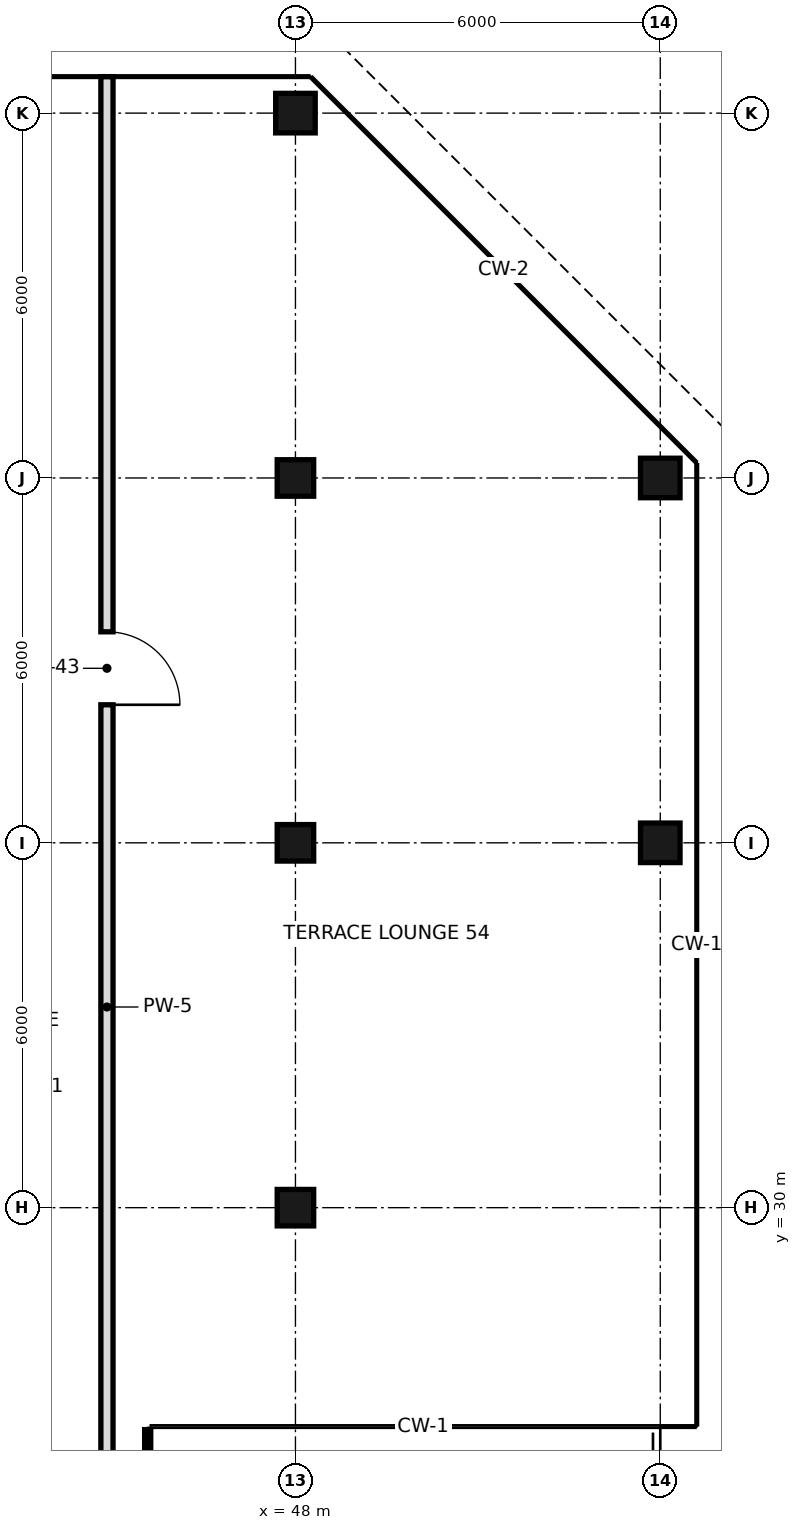
"""IFC4 building model, lengths in metres.
Left out: names, types, materials, properties, quantities, classifications, styles, units other than length and angle.
Written with IfcOpenShell. Run it as: python <this file> out.ifc"""

import sys

from ifc_helpers import new_model, si_unit, direction, frame, frame_2d, origin, origin_2d, place, context, subcontext, project, spatial, rectangle, hollow_rectangle, extrude, element, fill, save


model = new_model("IFC4")
c1 = context("Model", 3, precision=1e-05, world=origin(), true_north=direction((0.0, 1.0)))
c2 = subcontext(c1, "Body", "Model", "MODEL_VIEW")
j1 = project(units=[si_unit("LENGTHUNIT", "METRE"), si_unit("PLANEANGLEUNIT", "RADIAN")], contexts=[c1])
p1 = place(None, origin())
s1 = spatial("IfcSite", under=j1, at=p1, CompositionType="ELEMENT")
p2 = place(p1, origin())
s2 = spatial("IfcBuilding", under=s1, at=p2, CompositionType="ELEMENT")
p3 = place(p2, frame((0.0, 0.0, 229.8)))
s3 = spatial("IfcBuildingStorey", under=s2, at=p3, CompositionType="ELEMENT", Elevation=229.8)
for number, where, z_axis, x_axis in (
    (1, (48.0, 30.0, 0.0), (0.0, 0.0, 1.0), (1.0, 0.0, 0.0)),
    (2, (48.0, 36.0, 0.0), (0.0, 0.0, 1.0), (1.0, 0.0, 0.0)),
    (3, (48.0, 42.0, 0.0), (0.0, 0.0, 1.0), (1.0, 0.0, 0.0)),
):
    element("IfcColumn", number, at=place(p3, frame(where, z_axis=z_axis, x_axis=x_axis)), inside=s3, PredefinedType="COLUMN", context=c2, shape_type="SweptSolid", body=[
        extrude(hollow_rectangle(XDim=0.6, YDim=0.6, WallThickness=0.028, at=origin_2d()), origin(), (0.0, 0.0, 1.0), 4.4),
    ])
for number, where, z_axis, x_axis in (
    (4, (48.0, 48.0, 0.0), (0.0, 0.0, 1.0), (1.0, 0.0, 0.0)),
    (5, (54.0, 36.0, 0.0), (0.0, 0.0, 1.0), (1.0, 0.0, 0.0)),
    (6, (54.0, 42.0, 0.0), (0.0, 0.0, 1.0), (1.0, 0.0, 0.0)),
):
    element("IfcColumn", number, at=place(p3, frame(where, z_axis=z_axis, x_axis=x_axis)), inside=s3, PredefinedType="COLUMN", context=c2, shape_type="SweptSolid", body=[
        extrude(hollow_rectangle(XDim=0.65, YDim=0.65, WallThickness=0.032, at=origin_2d()), origin(), (0.0, 0.0, 1.0), 4.4),
    ])
p4 = place(p3, frame((45.57, 18.725, 0.0), z_axis=(0.0, 0.0, 1.0), x_axis=(0.0, 1.0, 0.0)))
e7 = element("IfcWall", 7, at=p4, inside=s3, PredefinedType="SOLIDWALL", context=c2, shape_type="SweptSolid", body=[
    extrude(rectangle(XDim=7.625, YDim=0.1, at=frame_2d((3.812, 0.0))), origin(), (0.0, 0.0, 1.0), 4.1),
])
p5 = place(p4, frame((4.675, 0.0, 0.0)))
e8 = element("IfcOpeningElement", 8, at=p5, cuts=e7, PredefinedType="OPENING", context=c2, shape_type="SweptSolid", body=[
    extrude(rectangle(XDim=2.4, YDim=2.4, at=frame_2d((1.2, 1.2))), frame((0.0, 0.06, 0.0), z_axis=(0.0, -1.0, 0.0), x_axis=(1.0, 0.0, 0.0)), (0.0, 0.0, 1.0), 0.12),
])
p6 = place(p3, frame((44.9, 18.0, 0.0), z_axis=(0.0, 0.0, 1.0), x_axis=(0.0, 1.0, 0.0)))
e9 = element("IfcWall", 9, at=p6, inside=s3, PredefinedType="SOLIDWALL", context=c2, shape_type="SweptSolid", body=[
    extrude(rectangle(XDim=30.6, YDim=0.2, at=frame_2d((15.3, 0.0))), origin(), (0.0, 0.0, 1.0), 3.4),
])
p7 = place(p6, frame((20.27, 0.0, 0.0)))
e10 = element("IfcOpeningElement", 10, at=p7, cuts=e9, PredefinedType="OPENING", context=c2, shape_type="SweptSolid", body=[
    extrude(rectangle(XDim=1.2, YDim=2.4, at=frame_2d((0.6, 1.2))), frame((0.0, 0.11, 0.0), z_axis=(0.0, -1.0, 0.0), x_axis=(1.0, 0.0, 0.0)), (0.0, 0.0, 1.0), 0.22),
])
p8 = place(p7, frame((1.2, 0.0, 0.0), z_axis=(0.0, 0.0, 1.0), x_axis=(-1.0, 0.0, 0.0)))
e11 = element("IfcDoor", 11, at=p8, inside=s3, OperationType="SINGLE_SWING_RIGHT", PredefinedType="DOOR", context=c2, shape_type="SweptSolid", body=[
    extrude(rectangle(XDim=1.2, YDim=2.4, at=frame_2d((0.6, 1.2))), frame((0.0, 0.025, 0.0), z_axis=(0.0, -1.0, 0.0), x_axis=(1.0, 0.0, 0.0)), (0.0, 0.0, 1.0), 0.05),
])
fill(e10, e11)
save(model, sys.argv[1])
